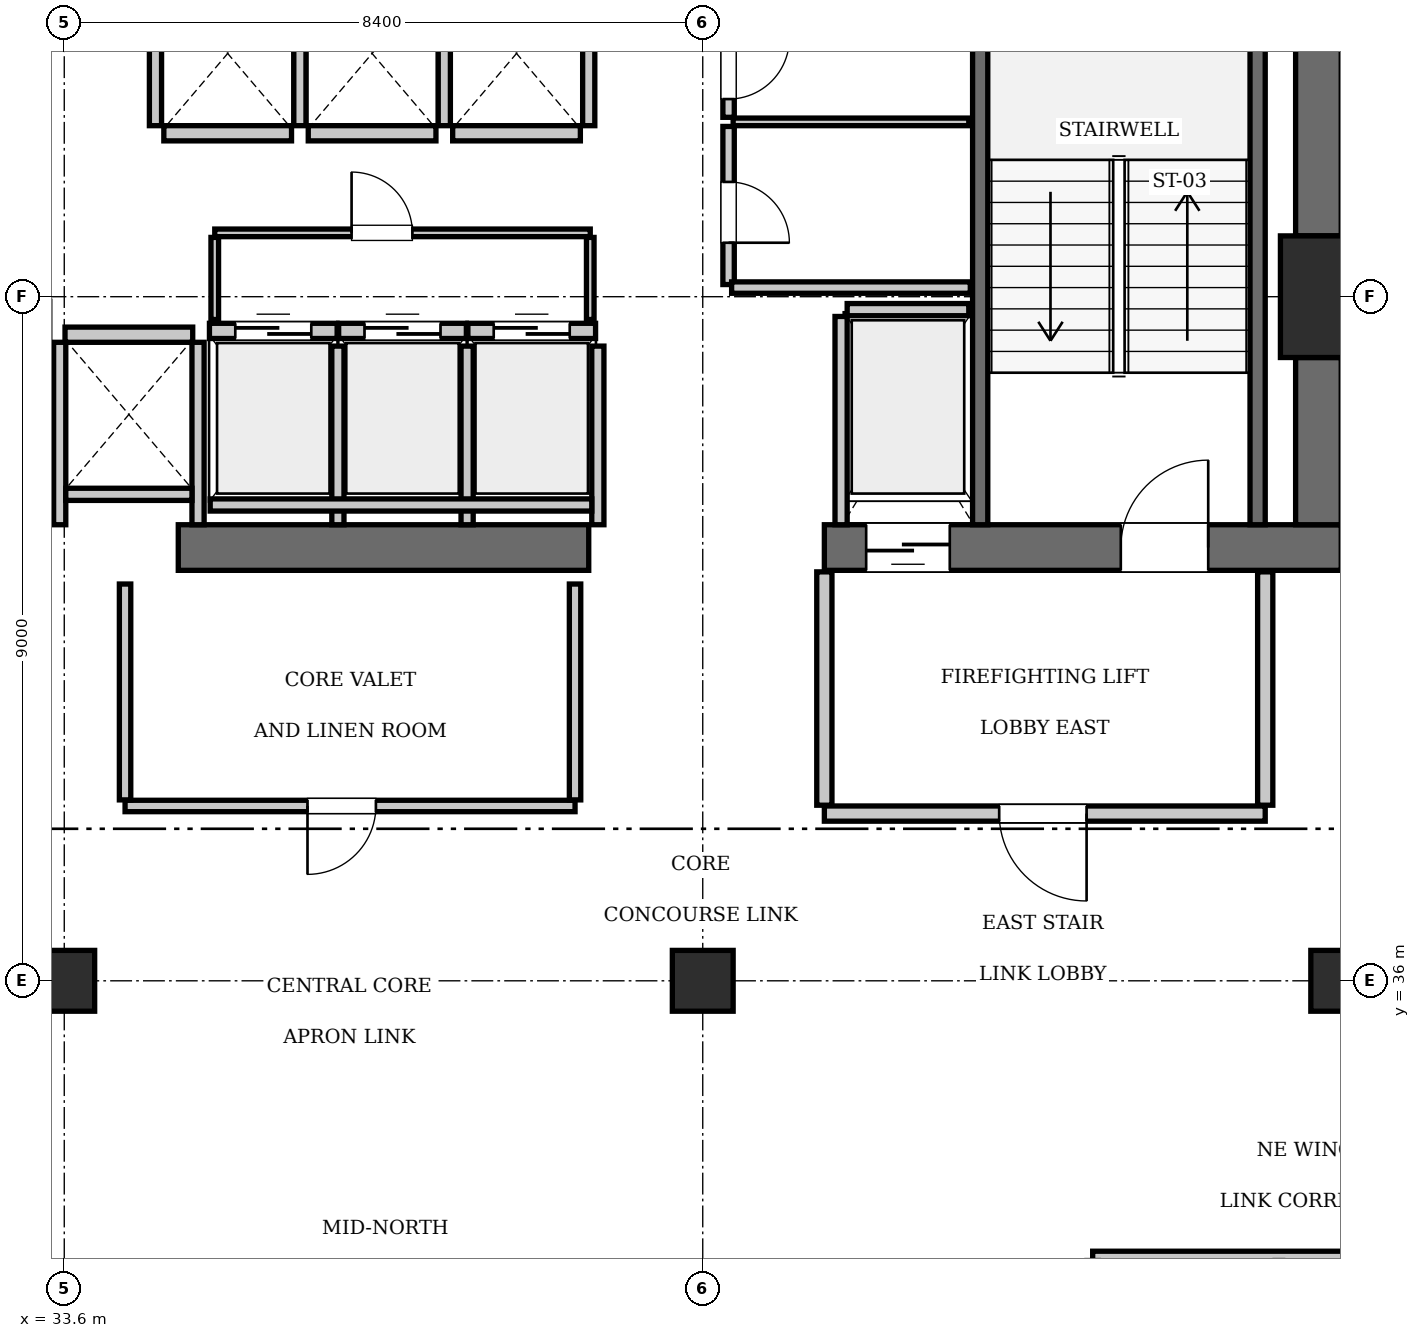
"""IFC4 building model, lengths in metres.
Left out: names, types, materials, properties, quantities, classifications, styles, units other than length and angle.
Written with IfcOpenShell. Run it as: python <this file> out.ifc"""

import sys

from ifc_helpers import new_model, si_unit, direction, frame, frame_2d, origin, origin_2d, place, context, subcontext, project, spatial, rectangle, extrude, element, fill, save


model = new_model("IFC4")
c1 = context("Model", 3, precision=1e-05, world=origin(), true_north=direction((0.0, 1.0)))
c2 = subcontext(c1, "Body", "Model", "MODEL_VIEW")
j1 = project(units=[si_unit("LENGTHUNIT", "METRE"), si_unit("PLANEANGLEUNIT", "RADIAN")], contexts=[c1])
p1 = place(None, origin())
s1 = spatial("IfcSite", under=j1, at=p1, CompositionType="ELEMENT")
p2 = place(p1, origin())
s2 = spatial("IfcBuilding", under=s1, at=p2, CompositionType="ELEMENT")
p3 = place(p2, frame((0.0, 0.0, 281.75)))
s3 = spatial("IfcBuildingStorey", under=s2, at=p3, CompositionType="ELEMENT", Elevation=281.75)
p4 = place(p3, frame((50.4, 45.0, 0.0), z_axis=(0.0, 0.0, 1.0), x_axis=(1.0, 0.0, 0.0)))
e1 = element("IfcColumn", 1, at=p4, inside=s3, PredefinedType="COLUMN", context=c2, shape_type="SweptSolid", body=[
    extrude(rectangle(XDim=1.6, YDim=1.6, at=origin_2d()), origin(), (0.0, 0.0, 1.0), 3.85),
])
p5 = place(p3, frame((35.1, 41.7, 0.0), z_axis=(0.0, 0.0, 1.0), x_axis=(1.0, 0.0, 0.0)))
e2 = element("IfcWall", 2, at=p5, inside=s3, PredefinedType="SHEAR", context=c2, shape_type="SweptSolid", body=[
    extrude(rectangle(XDim=5.4, YDim=0.6, at=frame_2d((2.7, 0.0))), origin(), (0.0, 0.0, 1.0), 3.85),
])
p6 = place(p3, frame((43.6, 41.7, 0.0), z_axis=(0.0, 0.0, 1.0), x_axis=(1.0, 0.0, 0.0)))
e3 = element("IfcWall", 3, at=p6, inside=s3, PredefinedType="SHEAR", context=c2, shape_type="SweptSolid", body=[
    extrude(rectangle(XDim=6.8, YDim=0.6, at=frame_2d((3.4, 0.0))), origin(), (0.0, 0.0, 1.0), 3.85),
])
p7 = place(p6, frame((3.9, 0.0, 0.0)))
e4 = element("IfcOpeningElement", 4, at=p7, cuts=e3, PredefinedType="OPENING", context=c2, shape_type="SweptSolid", body=[
    extrude(rectangle(XDim=1.15, YDim=2.15, at=frame_2d((0.575, 1.075))), frame((0.0, 0.31, 0.0), z_axis=(0.0, -1.0, 0.0), x_axis=(1.0, 0.0, 0.0)), (0.0, 0.0, 1.0), 0.62),
])
p8 = place(p6, frame((0.55, 0.0, 0.0)))
e5 = element("IfcOpeningElement", 5, at=p8, cuts=e3, PredefinedType="OPENING", context=c2, shape_type="SweptSolid", body=[
    extrude(rectangle(XDim=1.1, YDim=2.2, at=frame_2d((0.55, 1.1))), frame((0.0, 0.31, 0.0), z_axis=(0.0, -1.0, 0.0), x_axis=(1.0, 0.0, 0.0)), (0.0, 0.0, 1.0), 0.62),
])
p9 = place(p3, frame((50.1, 42.0, 0.0), z_axis=(0.0, 0.0, 1.0), x_axis=(0.0, 1.0, 0.0)))
e6 = element("IfcWall", 6, at=p9, inside=s3, PredefinedType="SHEAR", context=c2, shape_type="SweptSolid", body=[
    extrude(rectangle(XDim=2.2, YDim=0.6, at=frame_2d((1.1, 0.0))), origin(), (0.0, 0.0, 1.0), 3.85),
])
p10 = place(p3, frame((50.1, 45.8, 0.0), z_axis=(0.0, 0.0, 1.0), x_axis=(0.0, 1.0, 0.0)))
e7 = element("IfcWall", 7, at=p10, inside=s3, PredefinedType="SHEAR", context=c2, shape_type="SweptSolid", body=[
    extrude(rectangle(XDim=7.6, YDim=0.6, at=frame_2d((3.8, 0.0))), origin(), (0.0, 0.0, 1.0), 3.85),
])
for number, where, z_axis, x_axis in (
    (8, (33.6, 36.0, 0.0), (0.0, 0.0, 1.0), (1.0, 0.0, 0.0)),
    (9, (42.0, 36.0, 0.0), (0.0, 0.0, 1.0), (1.0, 0.0, 0.0)),
    (10, (50.4, 36.0, 0.0), (0.0, 0.0, 1.0), (1.0, 0.0, 0.0)),
):
    element("IfcColumn", number, at=place(p3, frame(where, z_axis=z_axis, x_axis=x_axis)), inside=s3, PredefinedType="COLUMN", context=c2, shape_type="SweptSolid", body=[
        extrude(rectangle(XDim=0.8, YDim=0.8, at=origin_2d()), origin(), (0.0, 0.0, 1.0), 3.85),
    ])
p11 = place(p3, frame((45.65, 42.0, 0.0), z_axis=(0.0, 0.0, 1.0), x_axis=(0.0, 1.0, 0.0)))
e11 = element("IfcWall", 11, at=p11, inside=s3, PredefinedType="SOLIDWALL", context=c2, shape_type="SweptSolid", body=[
    extrude(rectangle(XDim=9.15, YDim=0.2, at=frame_2d((4.575, 0.0))), origin(), (0.0, 0.0, 1.0), 3.61),
])
p12 = place(p3, frame((49.3, 42.0, 0.0), z_axis=(0.0, 0.0, 1.0), x_axis=(0.0, 1.0, 0.0)))
e12 = element("IfcWall", 12, at=p12, inside=s3, PredefinedType="SOLIDWALL", context=c2, shape_type="SweptSolid", body=[
    extrude(rectangle(XDim=9.12, YDim=0.2, at=frame_2d((4.56, 0.0))), origin(), (0.0, 0.0, 1.0), 3.61),
])
p13 = place(p3, frame((35.51, 44.55, 0.0), z_axis=(0.0, 0.0, 1.0), x_axis=(1.0, 0.0, 0.0)))
e13 = element("IfcWall", 13, at=p13, inside=s3, PredefinedType="SOLIDWALL", context=c2, shape_type="SweptSolid", body=[
    extrude(rectangle(XDim=1.68, YDim=0.2, at=frame_2d((0.84, 0.0))), origin(), (0.0, 0.0, 1.0), 3.61),
])
p14 = place(p13, frame((0.34, 0.0, 0.0)))
e14 = element("IfcOpeningElement", 14, at=p14, cuts=e13, PredefinedType="OPENING", context=c2, shape_type="SweptSolid", body=[
    extrude(rectangle(XDim=1.0, YDim=2.15, at=frame_2d((0.5, 1.075))), frame((0.0, 0.11, 0.0), z_axis=(0.0, -1.0, 0.0), x_axis=(1.0, 0.0, 0.0)), (0.0, 0.0, 1.0), 0.22),
])
p15 = place(p3, frame((37.21, 44.55, 0.0), z_axis=(0.0, 0.0, 1.0), x_axis=(1.0, 0.0, 0.0)))
e15 = element("IfcWall", 15, at=p15, inside=s3, PredefinedType="SOLIDWALL", context=c2, shape_type="SweptSolid", body=[
    extrude(rectangle(XDim=1.68, YDim=0.2, at=frame_2d((0.84, 0.0))), origin(), (0.0, 0.0, 1.0), 3.61),
])
p16 = place(p15, frame((0.34, 0.0, 0.0)))
e16 = element("IfcOpeningElement", 16, at=p16, cuts=e15, PredefinedType="OPENING", context=c2, shape_type="SweptSolid", body=[
    extrude(rectangle(XDim=1.0, YDim=2.15, at=frame_2d((0.5, 1.075))), frame((0.0, 0.11, 0.0), z_axis=(0.0, -1.0, 0.0), x_axis=(1.0, 0.0, 0.0)), (0.0, 0.0, 1.0), 0.22),
])
p17 = place(p3, frame((38.91, 44.55, 0.0), z_axis=(0.0, 0.0, 1.0), x_axis=(1.0, 0.0, 0.0)))
e17 = element("IfcWall", 17, at=p17, inside=s3, PredefinedType="SOLIDWALL", context=c2, shape_type="SweptSolid", body=[
    extrude(rectangle(XDim=1.68, YDim=0.2, at=frame_2d((0.84, 0.0))), origin(), (0.0, 0.0, 1.0), 3.61),
])
p18 = place(p17, frame((0.34, 0.0, 0.0)))
e18 = element("IfcOpeningElement", 18, at=p18, cuts=e17, PredefinedType="OPENING", context=c2, shape_type="SweptSolid", body=[
    extrude(rectangle(XDim=1.0, YDim=2.15, at=frame_2d((0.5, 1.075))), frame((0.0, 0.11, 0.0), z_axis=(0.0, -1.0, 0.0), x_axis=(1.0, 0.0, 0.0)), (0.0, 0.0, 1.0), 0.22),
])
p19 = place(p3, frame((34.91, 47.15, 0.0), z_axis=(0.0, 0.0, 1.0), x_axis=(1.0, 0.0, 0.0)))
e19 = element("IfcWall", 19, at=p19, inside=s3, PredefinedType="SOLIDWALL", context=c2, shape_type="SweptSolid", body=[
    extrude(rectangle(XDim=1.68, YDim=0.2, at=frame_2d((0.84, 0.0))), origin(), (0.0, 0.0, 1.0), 3.61),
])
for number, where, z_axis, x_axis in (
    (20, (36.81, 47.15, 0.0), (0.0, 0.0, 1.0), (1.0, 0.0, 0.0)),
    (21, (38.71, 47.15, 0.0), (0.0, 0.0, 1.0), (1.0, 0.0, 0.0)),
    (22, (33.61, 44.5, 0.0), (0.0, 0.0, 1.0), (1.0, 0.0, 0.0)),
):
    element("IfcWall", number, at=place(p3, frame(where, z_axis=z_axis, x_axis=x_axis)), inside=s3, PredefinedType="SOLIDWALL", context=c2, shape_type="SweptSolid", body=[
        extrude(rectangle(XDim=1.68, YDim=0.2, at=frame_2d((0.84, 0.0))), origin(), (0.0, 0.0, 1.0), 3.61),
    ])
p20 = place(p3, frame((43.9, 44.83, 0.0), z_axis=(0.0, 0.0, 1.0), x_axis=(1.0, 0.0, 0.0)))
e23 = element("IfcWall", 23, at=p20, inside=s3, PredefinedType="SOLIDWALL", context=c2, shape_type="SweptSolid", body=[
    extrude(rectangle(XDim=1.6, YDim=0.16, at=frame_2d((0.8, 0.0))), origin(), (0.0, 0.0, 1.0), 3.61),
])
p21 = place(p3, frame((43.82, 42.0, 0.0), z_axis=(0.0, 0.0, 1.0), x_axis=(0.0, 1.0, 0.0)))
e24 = element("IfcWall", 24, at=p21, inside=s3, PredefinedType="SOLIDWALL", context=c2, shape_type="SweptSolid", body=[
    extrude(rectangle(XDim=2.74, YDim=0.16, at=frame_2d((1.37, 0.0))), origin(), (0.0, 0.0, 1.0), 3.61),
])
for number, where, z_axis, x_axis in (
    (25, (37.2, 42.0, 0.0), (0.0, 0.0, 1.0), (0.0, 1.0, 0.0)),
    (26, (38.9, 42.0, 0.0), (0.0, 0.0, 1.0), (0.0, 1.0, 0.0)),
    (27, (40.62, 42.0, 0.0), (0.0, 0.0, 1.0), (0.0, 1.0, 0.0)),
):
    element("IfcWall", number, at=place(p3, frame(where, z_axis=z_axis, x_axis=x_axis)), inside=s3, PredefinedType="SOLIDWALL", context=c2, shape_type="SweptSolid", body=[
        extrude(rectangle(XDim=2.35, YDim=0.16, at=frame_2d((1.175, 0.0))), origin(), (0.0, 0.0, 1.0), 3.61),
    ])
p22 = place(p3, frame((35.52, 42.26, 0.0), z_axis=(0.0, 0.0, 1.0), x_axis=(1.0, 0.0, 0.0)))
e28 = element("IfcWall", 28, at=p22, inside=s3, PredefinedType="SOLIDWALL", context=c2, shape_type="SweptSolid", body=[
    extrude(rectangle(XDim=5.02, YDim=0.16, at=frame_2d((2.51, 0.0))), origin(), (0.0, 0.0, 1.0), 3.61),
])
for number, where, z_axis, x_axis in (
    (29, (34.8, 47.25, 0.0), (0.0, 0.0, 1.0), (0.0, 1.0, 0.0)),
    (30, (36.7, 47.25, 0.0), (0.0, 0.0, 1.0), (0.0, 1.0, 0.0)),
    (31, (38.6, 47.25, 0.0), (0.0, 0.0, 1.0), (0.0, 1.0, 0.0)),
    (32, (40.5, 47.25, 0.0), (0.0, 0.0, 1.0), (0.0, 1.0, 0.0)),
):
    element("IfcWall", number, at=place(p3, frame(where, z_axis=z_axis, x_axis=x_axis)), inside=s3, PredefinedType="SOLIDWALL", context=c2, shape_type="SweptSolid", body=[
        extrude(rectangle(XDim=2.19, YDim=0.16, at=frame_2d((1.095, 0.0))), origin(), (0.0, 0.0, 1.0), 3.61),
    ])
for number, where, z_axis, x_axis in (
    (33, (33.54, 42.0, 0.0), (0.0, 0.0, 1.0), (0.0, 1.0, 0.0)),
    (34, (35.36, 42.0, 0.0), (0.0, 0.0, 1.0), (0.0, 1.0, 0.0)),
):
    element("IfcWall", number, at=place(p3, frame(where, z_axis=z_axis, x_axis=x_axis)), inside=s3, PredefinedType="SOLIDWALL", context=c2, shape_type="SweptSolid", body=[
        extrude(rectangle(XDim=2.4, YDim=0.16, at=frame_2d((1.2, 0.0))), origin(), (0.0, 0.0, 1.0), 3.61),
    ])
p23 = place(p3, frame((33.62, 42.4, 0.0), z_axis=(0.0, 0.0, 1.0), x_axis=(1.0, 0.0, 0.0)))
e35 = element("IfcWall", 35, at=p23, inside=s3, PredefinedType="SOLIDWALL", context=c2, shape_type="SweptSolid", body=[
    extrude(rectangle(XDim=1.66, YDim=0.16, at=frame_2d((0.83, 0.0))), origin(), (0.0, 0.0, 1.0), 3.61),
])
p24 = place(p3, frame((43.6, 38.2, 0.0), z_axis=(0.0, 0.0, 1.0), x_axis=(1.0, 0.0, 0.0)))
e36 = element("IfcWall", 36, at=p24, inside=s3, PredefinedType="PARTITIONING", context=c2, shape_type="SweptSolid", body=[
    extrude(rectangle(XDim=5.8, YDim=0.2, at=frame_2d((2.9, 0.0))), origin(), (0.0, 0.0, 1.0), 3.61),
])
p25 = place(p24, frame((2.3, 0.0, 0.0)))
e37 = element("IfcOpeningElement", 37, at=p25, cuts=e36, PredefinedType="OPENING", context=c2, shape_type="SweptSolid", body=[
    extrude(rectangle(XDim=1.15, YDim=2.15, at=frame_2d((0.575, 1.075))), frame((0.0, 0.11, 0.0), z_axis=(0.0, -1.0, 0.0), x_axis=(1.0, 0.0, 0.0)), (0.0, 0.0, 1.0), 0.22),
])
for number, where, z_axis, x_axis in (
    (38, (43.6, 38.31, 0.0), (0.0, 0.0, 1.0), (0.0, 1.0, 0.0)),
    (39, (49.4, 38.31, 0.0), (0.0, 0.0, 1.0), (0.0, 1.0, 0.0)),
):
    element("IfcWall", number, at=place(p3, frame(where, z_axis=z_axis, x_axis=x_axis)), inside=s3, PredefinedType="PARTITIONING", context=c2, shape_type="SweptSolid", body=[
        extrude(rectangle(XDim=3.07, YDim=0.2, at=frame_2d((1.535, 0.0))), origin(), (0.0, 0.0, 1.0), 3.61),
    ])
p26 = place(p3, frame((35.58, 45.84, 0.0), z_axis=(0.0, 0.0, 1.0), x_axis=(1.0, 0.0, 0.0)))
e40 = element("IfcWall", 40, at=p26, inside=s3, PredefinedType="PARTITIONING", context=c2, shape_type="SweptSolid", body=[
    extrude(rectangle(XDim=4.94, YDim=0.1, at=frame_2d((2.47, 0.0))), origin(), (0.0, 0.0, 1.0), 3.61),
])
p27 = place(p26, frame((1.8, 0.0, 0.0)))
e41 = element("IfcOpeningElement", 41, at=p27, cuts=e40, PredefinedType="OPENING", context=c2, shape_type="SweptSolid", body=[
    extrude(rectangle(XDim=0.8, YDim=2.05, at=frame_2d((0.4, 1.025))), frame((0.0, 0.06, 0.0), z_axis=(0.0, -1.0, 0.0), x_axis=(1.0, 0.0, 0.0)), (0.0, 0.0, 1.0), 0.12),
])
for number, where, z_axis, x_axis in (
    (42, (35.58, 44.7, 0.0), (0.0, 0.0, 1.0), (0.0, 1.0, 0.0)),
    (43, (40.52, 44.7, 0.0), (0.0, 0.0, 1.0), (0.0, 1.0, 0.0)),
):
    element("IfcWall", number, at=place(p3, frame(where, z_axis=z_axis, x_axis=x_axis)), inside=s3, PredefinedType="PARTITIONING", context=c2, shape_type="SweptSolid", body=[
        extrude(rectangle(XDim=1.08, YDim=0.1, at=frame_2d((0.54, 0.0))), origin(), (0.0, 0.0, 1.0), 3.61),
    ])
p28 = place(p3, frame((42.34, 45.16, 0.0), z_axis=(0.0, 0.0, 1.0), x_axis=(0.0, 1.0, 0.0)))
e44 = element("IfcWall", 44, at=p28, inside=s3, PredefinedType="PARTITIONING", context=c2, shape_type="SweptSolid", body=[
    extrude(rectangle(XDim=2.08, YDim=0.15, at=frame_2d((1.04, 0.0))), origin(), (0.0, 0.0, 1.0), 3.61),
])
p29 = place(p28, frame((0.55, 0.0, 0.0)))
e45 = element("IfcOpeningElement", 45, at=p29, cuts=e44, PredefinedType="OPENING", context=c2, shape_type="SweptSolid", body=[
    extrude(rectangle(XDim=0.8, YDim=2.05, at=frame_2d((0.4, 1.025))), frame((0.0, 0.085, 0.0), z_axis=(0.0, -1.0, 0.0), x_axis=(1.0, 0.0, 0.0)), (0.0, 0.0, 1.0), 0.17),
])
p30 = place(p3, frame((42.34, 47.36, 0.0), z_axis=(0.0, 0.0, 1.0), x_axis=(0.0, 1.0, 0.0)))
e46 = element("IfcWall", 46, at=p30, inside=s3, PredefinedType="PARTITIONING", context=c2, shape_type="SweptSolid", body=[
    extrude(rectangle(XDim=2.06, YDim=0.15, at=frame_2d((1.03, 0.0))), origin(), (0.0, 0.0, 1.0), 3.61),
])
p31 = place(p30, frame((0.24, 0.0, 0.0)))
e47 = element("IfcOpeningElement", 47, at=p31, cuts=e46, PredefinedType="OPENING", context=c2, shape_type="SweptSolid", body=[
    extrude(rectangle(XDim=0.8, YDim=2.05, at=frame_2d((0.4, 1.025))), frame((0.0, 0.085, 0.0), z_axis=(0.0, -1.0, 0.0), x_axis=(1.0, 0.0, 0.0)), (0.0, 0.0, 1.0), 0.17),
])
p32 = place(p3, frame((42.4, 47.3, 0.0), z_axis=(0.0, 0.0, 1.0), x_axis=(1.0, 0.0, 0.0)))
e48 = element("IfcWall", 48, at=p32, inside=s3, PredefinedType="PARTITIONING", context=c2, shape_type="SweptSolid", body=[
    extrude(rectangle(XDim=3.1, YDim=0.1, at=frame_2d((1.55, 0.0))), origin(), (0.0, 0.0, 1.0), 3.61),
])
p33 = place(p3, frame((42.38, 45.12, 0.0), z_axis=(0.0, 0.0, 1.0), x_axis=(1.0, 0.0, 0.0)))
e49 = element("IfcWall", 49, at=p33, inside=s3, PredefinedType="PARTITIONING", context=c2, shape_type="SweptSolid", body=[
    extrude(rectangle(XDim=3.14, YDim=0.15, at=frame_2d((1.57, 0.0))), origin(), (0.0, 0.0, 1.0), 3.61),
])
p34 = place(p3, frame((34.4, 38.3, 0.0), z_axis=(0.0, 0.0, 1.0), x_axis=(1.0, 0.0, 0.0)))
e50 = element("IfcWall", 50, at=p34, inside=s3, PredefinedType="PARTITIONING", context=c2, shape_type="SweptSolid", body=[
    extrude(rectangle(XDim=5.92, YDim=0.15, at=frame_2d((2.96, 0.0))), origin(), (0.0, 0.0, 1.0), 3.61),
])
p35 = place(p34, frame((2.4, 0.0, 0.0)))
e51 = element("IfcOpeningElement", 51, at=p35, cuts=e50, PredefinedType="OPENING", context=c2, shape_type="SweptSolid", body=[
    extrude(rectangle(XDim=0.9, YDim=2.1, at=frame_2d((0.45, 1.05))), frame((0.0, 0.085, 0.0), z_axis=(0.0, -1.0, 0.0), x_axis=(1.0, 0.0, 0.0)), (0.0, 0.0, 1.0), 0.17),
])
for number, where, z_axis, x_axis in (
    (52, (34.4, 38.38, 0.0), (0.0, 0.0, 1.0), (0.0, 1.0, 0.0)),
    (53, (40.32, 38.38, 0.0), (0.0, 0.0, 1.0), (0.0, 1.0, 0.0)),
):
    element("IfcWall", number, at=place(p3, frame(where, z_axis=z_axis, x_axis=x_axis)), inside=s3, PredefinedType="PARTITIONING", context=c2, shape_type="SweptSolid", body=[
        extrude(rectangle(XDim=2.84, YDim=0.15, at=frame_2d((1.42, 0.0))), origin(), (0.0, 0.0, 1.0), 3.61),
    ])
p36 = place(p3, frame((47.13, 32.38, 0.0), z_axis=(0.0, 0.0, 1.0), x_axis=(1.0, 0.0, 0.0)))
e54 = element("IfcWall", 54, at=p36, inside=s3, PredefinedType="PARTITIONING", context=c2, shape_type="SweptSolid", body=[
    extrude(rectangle(XDim=12.97, YDim=0.125, at=frame_2d((6.485, 0.0))), origin(), (0.0, 0.0, 1.0), 3.61),
])
p37 = place(p7, origin())
e55 = element("IfcDoor", 55, at=p37, inside=s3, OperationType="SINGLE_SWING_RIGHT", PredefinedType="DOOR", context=c2, shape_type="SweptSolid", body=[
    extrude(rectangle(XDim=1.15, YDim=2.15, at=frame_2d((0.575, 1.075))), frame((0.0, 0.025, 0.0), z_axis=(0.0, -1.0, 0.0), x_axis=(1.0, 0.0, 0.0)), (0.0, 0.0, 1.0), 0.05),
])
fill(e4, e55)
p38 = place(p14, origin())
e56 = element("IfcDoor", 56, at=p38, inside=s3, OperationType="SLIDING_TO_LEFT", PredefinedType="DOOR", context=c2, shape_type="SweptSolid", body=[
    extrude(rectangle(XDim=1.0, YDim=2.15, at=frame_2d((0.5, 1.075))), frame((0.0, 0.025, 0.0), z_axis=(0.0, -1.0, 0.0), x_axis=(1.0, 0.0, 0.0)), (0.0, 0.0, 1.0), 0.05),
])
fill(e14, e56)
p39 = place(p16, origin())
e57 = element("IfcDoor", 57, at=p39, inside=s3, OperationType="SLIDING_TO_LEFT", PredefinedType="DOOR", context=c2, shape_type="SweptSolid", body=[
    extrude(rectangle(XDim=1.0, YDim=2.15, at=frame_2d((0.5, 1.075))), frame((0.0, 0.025, 0.0), z_axis=(0.0, -1.0, 0.0), x_axis=(1.0, 0.0, 0.0)), (0.0, 0.0, 1.0), 0.05),
])
fill(e16, e57)
p40 = place(p18, origin())
e58 = element("IfcDoor", 58, at=p40, inside=s3, OperationType="SLIDING_TO_LEFT", PredefinedType="DOOR", context=c2, shape_type="SweptSolid", body=[
    extrude(rectangle(XDim=1.0, YDim=2.15, at=frame_2d((0.5, 1.075))), frame((0.0, 0.025, 0.0), z_axis=(0.0, -1.0, 0.0), x_axis=(1.0, 0.0, 0.0)), (0.0, 0.0, 1.0), 0.05),
])
fill(e18, e58)
p41 = place(p8, frame((1.1, 0.0, 0.0), z_axis=(0.0, 0.0, 1.0), x_axis=(-1.0, 0.0, 0.0)))
e59 = element("IfcDoor", 59, at=p41, inside=s3, OperationType="SLIDING_TO_LEFT", PredefinedType="DOOR", context=c2, shape_type="SweptSolid", body=[
    extrude(rectangle(XDim=1.1, YDim=2.2, at=frame_2d((0.55, 1.1))), frame((0.0, 0.025, 0.0), z_axis=(0.0, -1.0, 0.0), x_axis=(1.0, 0.0, 0.0)), (0.0, 0.0, 1.0), 0.05),
])
fill(e5, e59)
p42 = place(p25, frame((1.15, 0.0, 0.0), z_axis=(0.0, 0.0, 1.0), x_axis=(-1.0, 0.0, 0.0)))
e60 = element("IfcDoor", 60, at=p42, inside=s3, OperationType="SINGLE_SWING_LEFT", PredefinedType="DOOR", context=c2, shape_type="SweptSolid", body=[
    extrude(rectangle(XDim=1.15, YDim=2.15, at=frame_2d((0.575, 1.075))), frame((0.0, 0.025, 0.0), z_axis=(0.0, -1.0, 0.0), x_axis=(1.0, 0.0, 0.0)), (0.0, 0.0, 1.0), 0.05),
])
fill(e37, e60)
p43 = place(p27, origin())
e61 = element("IfcDoor", 61, at=p43, inside=s3, OperationType="SINGLE_SWING_LEFT", PredefinedType="DOOR", context=c2, shape_type="SweptSolid", body=[
    extrude(rectangle(XDim=0.8, YDim=2.05, at=frame_2d((0.4, 1.025))), frame((0.0, 0.025, 0.0), z_axis=(0.0, -1.0, 0.0), x_axis=(1.0, 0.0, 0.0)), (0.0, 0.0, 1.0), 0.05),
])
fill(e41, e61)
p44 = place(p29, frame((0.8, 0.0, 0.0), z_axis=(0.0, 0.0, 1.0), x_axis=(-1.0, 0.0, 0.0)))
e62 = element("IfcDoor", 62, at=p44, inside=s3, OperationType="SINGLE_SWING_RIGHT", PredefinedType="DOOR", context=c2, shape_type="SweptSolid", body=[
    extrude(rectangle(XDim=0.8, YDim=2.05, at=frame_2d((0.4, 1.025))), frame((0.0, 0.025, 0.0), z_axis=(0.0, -1.0, 0.0), x_axis=(1.0, 0.0, 0.0)), (0.0, 0.0, 1.0), 0.05),
])
fill(e45, e62)
p45 = place(p31, frame((0.8, 0.0, 0.0), z_axis=(0.0, 0.0, 1.0), x_axis=(-1.0, 0.0, 0.0)))
e63 = element("IfcDoor", 63, at=p45, inside=s3, OperationType="SINGLE_SWING_LEFT", PredefinedType="DOOR", context=c2, shape_type="SweptSolid", body=[
    extrude(rectangle(XDim=0.8, YDim=2.05, at=frame_2d((0.4, 1.025))), frame((0.0, 0.025, 0.0), z_axis=(0.0, -1.0, 0.0), x_axis=(1.0, 0.0, 0.0)), (0.0, 0.0, 1.0), 0.05),
])
fill(e47, e63)
p46 = place(p35, frame((0.9, 0.0, 0.0), z_axis=(0.0, 0.0, 1.0), x_axis=(-1.0, 0.0, 0.0)))
e64 = element("IfcDoor", 64, at=p46, inside=s3, OperationType="SINGLE_SWING_RIGHT", PredefinedType="DOOR", context=c2, shape_type="SweptSolid", body=[
    extrude(rectangle(XDim=0.9, YDim=2.1, at=frame_2d((0.45, 1.05))), frame((0.0, 0.025, 0.0), z_axis=(0.0, -1.0, 0.0), x_axis=(1.0, 0.0, 0.0)), (0.0, 0.0, 1.0), 0.05),
])
fill(e51, e64)
save(model, sys.argv[1])
